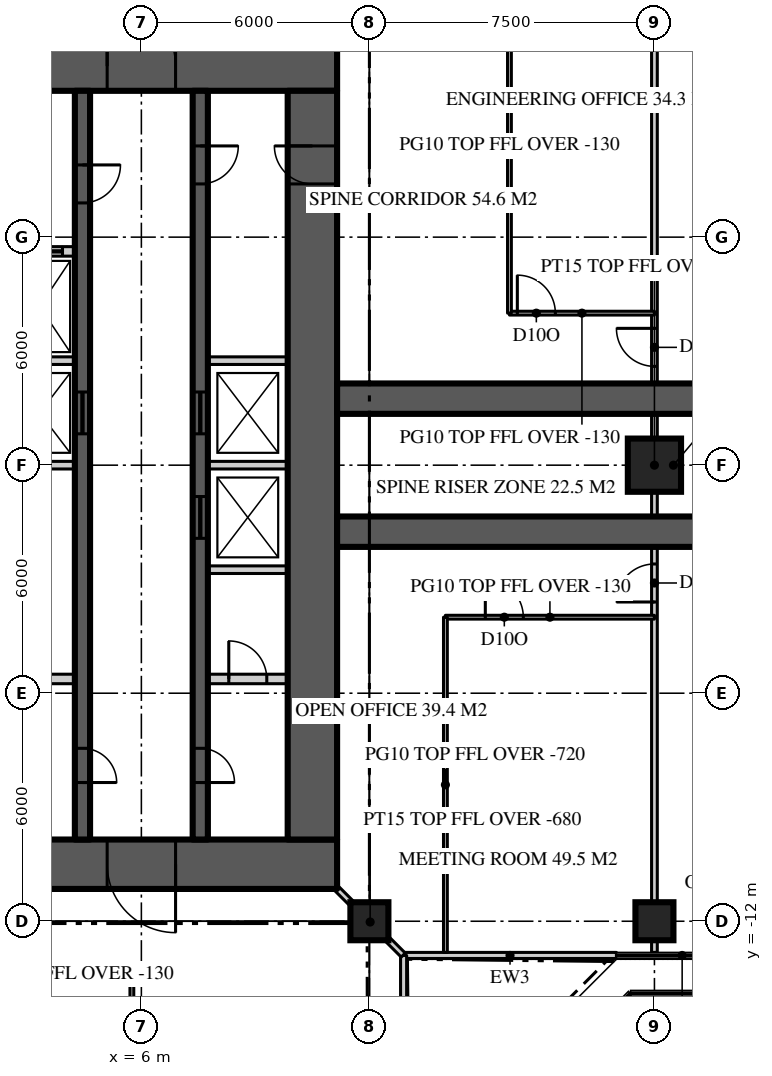
"""IFC4 building model, lengths in metres.
Left out: names, types, materials, properties, quantities, classifications, styles, units other than length and angle.
Written with IfcOpenShell. Run it as: python <this file> out.ifc"""

import sys

from ifc_helpers import new_model, si_unit, direction, frame, frame_2d, origin, origin_2d, place, context, subcontext, project, spatial, rectangle, extrude, element, fill, save


model = new_model("IFC4")
c1 = context("Model", 3, precision=1e-05, world=origin(), true_north=direction((0.0, 1.0)))
c2 = subcontext(c1, "Body", "Model", "MODEL_VIEW")
j1 = project(units=[si_unit("LENGTHUNIT", "METRE"), si_unit("PLANEANGLEUNIT", "RADIAN")], contexts=[c1])
p1 = place(None, origin())
s1 = spatial("IfcSite", under=j1, at=p1, CompositionType="ELEMENT")
p2 = place(p1, origin())
s2 = spatial("IfcBuilding", under=s1, at=p2, CompositionType="ELEMENT")
p3 = place(p2, frame((0.0, 0.0, 271.2)))
s3 = spatial("IfcBuildingStorey", under=s2, at=p3, CompositionType="ELEMENT", Elevation=271.2)
p4 = place(p3, frame((-11.15, 10.5, 0.0), z_axis=(0.0, 0.0, 1.0), x_axis=(1.0, 0.0, 0.0)))
e1 = element("IfcWall", 1, at=p4, inside=s3, PredefinedType="SHEAR", context=c2, shape_type="SweptSolid", body=[
    extrude(rectangle(XDim=22.3, YDim=1.3, at=frame_2d((11.15, 0.0))), origin(), (0.0, 0.0, 1.0), 3.9),
])
p5 = place(p4, frame((4.25, 0.0, 0.0)))
e2 = element("IfcOpeningElement", 2, at=p5, cuts=e1, PredefinedType="OPENING", context=c2, shape_type="SweptSolid", body=[
    extrude(rectangle(XDim=1.8, YDim=2.2, at=frame_2d((0.9, 1.1))), frame((0.0, 0.66, 0.0), z_axis=(0.0, -1.0, 0.0), x_axis=(1.0, 0.0, 0.0)), (0.0, 0.0, 1.0), 1.32),
])
p6 = place(p4, frame((16.25, 0.0, 0.0)))
e3 = element("IfcOpeningElement", 3, at=p6, cuts=e1, PredefinedType="OPENING", context=c2, shape_type="SweptSolid", body=[
    extrude(rectangle(XDim=1.8, YDim=2.2, at=frame_2d((0.9, 1.1))), frame((0.0, 0.66, 0.0), z_axis=(0.0, -1.0, 0.0), x_axis=(1.0, 0.0, 0.0)), (0.0, 0.0, 1.0), 1.32),
])
p7 = place(p3, frame((11.15, -10.5, 0.0), z_axis=(0.0, 0.0, 1.0), x_axis=(-1.0, 0.0, 0.0)))
e4 = element("IfcWall", 4, at=p7, inside=s3, PredefinedType="SHEAR", context=c2, shape_type="SweptSolid", body=[
    extrude(rectangle(XDim=22.3, YDim=1.3, at=frame_2d((11.15, 0.0))), origin(), (0.0, 0.0, 1.0), 3.9),
])
p8 = place(p7, frame((16.25, 0.0, 0.0)))
e5 = element("IfcOpeningElement", 5, at=p8, cuts=e4, PredefinedType="OPENING", context=c2, shape_type="SweptSolid", body=[
    extrude(rectangle(XDim=1.8, YDim=2.2, at=frame_2d((0.9, 1.1))), frame((0.0, 0.66, 0.0), z_axis=(0.0, -1.0, 0.0), x_axis=(1.0, 0.0, 0.0)), (0.0, 0.0, 1.0), 1.32),
])
p9 = place(p7, frame((4.25, 0.0, 0.0)))
e6 = element("IfcOpeningElement", 6, at=p9, cuts=e4, PredefinedType="OPENING", context=c2, shape_type="SweptSolid", body=[
    extrude(rectangle(XDim=1.8, YDim=2.2, at=frame_2d((0.9, 1.1))), frame((0.0, 0.66, 0.0), z_axis=(0.0, -1.0, 0.0), x_axis=(1.0, 0.0, 0.0)), (0.0, 0.0, 1.0), 1.32),
])
p10 = place(p3, frame((10.5, -9.85, 0.0), z_axis=(0.0, 0.0, 1.0), x_axis=(0.0, 1.0, 0.0)))
e7 = element("IfcWall", 7, at=p10, inside=s3, PredefinedType="SHEAR", context=c2, shape_type="SweptSolid", body=[
    extrude(rectangle(XDim=19.7, YDim=1.3, at=frame_2d((9.85, 0.0))), origin(), (0.0, 0.0, 1.0), 3.9),
])
p11 = place(p10, frame((17.25, 0.0, 0.0)))
e8 = element("IfcOpeningElement", 8, at=p11, cuts=e7, PredefinedType="OPENING", context=c2, shape_type="SweptSolid", body=[
    extrude(rectangle(XDim=1.0, YDim=2.2, at=frame_2d((0.5, 1.1))), frame((0.0, 0.66, 0.0), z_axis=(0.0, -1.0, 0.0), x_axis=(1.0, 0.0, 0.0)), (0.0, 0.0, 1.0), 1.32),
])
for number, where, z_axis, x_axis in (
    (9, (11.15, -1.75, 0.0), (0.0, 0.0, 1.0), (1.0, 0.0, 0.0)),
    (10, (11.15, 1.75, 0.0), (0.0, 0.0, 1.0), (1.0, 0.0, 0.0)),
):
    element("IfcWall", number, at=place(p3, frame(where, z_axis=z_axis, x_axis=x_axis)), inside=s3, PredefinedType="SHEAR", context=c2, shape_type="SweptSolid", body=[
        extrude(rectangle(XDim=15.25, YDim=0.8, at=frame_2d((7.625, 0.0))), origin(), (0.0, 0.0, 1.0), 3.9),
    ])
for number, where, z_axis, x_axis in (
    (11, (12.0, -12.0, 0.0), (0.0, 0.0, 1.0), (1.0, 0.0, 0.0)),
    (12, (19.5, -12.0, 0.0), (0.0, 0.0, 1.0), (1.0, 0.0, 0.0)),
):
    element("IfcColumn", number, at=place(p3, frame(where, z_axis=z_axis, x_axis=x_axis)), inside=s3, PredefinedType="COLUMN", context=c2, shape_type="SweptSolid", body=[
        extrude(rectangle(XDim=1.0, YDim=1.0, at=origin_2d()), origin(), (0.0, 0.0, 1.0), 3.9),
    ])
p12 = place(p3, frame((19.5, 0.0, 0.0), z_axis=(0.0, 0.0, 1.0), x_axis=(1.0, 0.0, 0.0)))
e13 = element("IfcColumn", 13, at=p12, inside=s3, PredefinedType="COLUMN", context=c2, shape_type="SweptSolid", body=[
    extrude(rectangle(XDim=1.4, YDim=1.4, at=origin_2d()), origin(), (0.0, 0.0, 1.0), 3.9),
])
p13 = place(p3, frame((12.9, -12.9, 0.0), z_axis=(0.0, 0.0, 1.0), x_axis=(1.0, 0.0, 0.0)))
e14 = element("IfcWall", 14, at=p13, inside=s3, PredefinedType="SOLIDWALL", context=c2, shape_type="SweptSolid", body=[
    extrude(rectangle(XDim=5.6, YDim=0.16, at=frame_2d((2.8, 0.0))), origin(), (0.0, 0.0, 1.0), 3.77),
])
p14 = place(p3, frame((12.9, -18.5, 0.0), z_axis=(0.0, 0.0, 1.0), x_axis=(0.0, 1.0, 0.0)))
e15 = element("IfcWall", 15, at=p14, inside=s3, PredefinedType="SOLIDWALL", context=c2, shape_type="SweptSolid", body=[
    extrude(rectangle(XDim=5.6, YDim=0.16, at=frame_2d((2.8, 0.0))), origin(), (0.0, 0.0, 1.0), 3.77),
])
p15 = place(p14, frame((2.3, 0.0, 0.0)))
e16 = element("IfcOpeningElement", 16, at=p15, cuts=e15, PredefinedType="OPENING", context=c2, shape_type="SweptSolid", body=[
    extrude(rectangle(XDim=1.0, YDim=2.2, at=frame_2d((0.5, 1.1))), frame((0.0, 0.09, 0.0), z_axis=(0.0, -1.0, 0.0), x_axis=(1.0, 0.0, 0.0)), (0.0, 0.0, 1.0), 0.18),
])
p16 = place(p3, frame((7.55, 9.85, 0.0), z_axis=(0.0, 0.0, 1.0), x_axis=(0.0, -1.0, 0.0)))
e17 = element("IfcWall", 17, at=p16, inside=s3, PredefinedType="SHEAR", context=c2, shape_type="SweptSolid", body=[
    extrude(rectangle(XDim=19.7, YDim=0.4, at=frame_2d((9.85, 0.0))), origin(), (0.0, 0.0, 1.0), 3.9),
])
p17 = place(p16, frame((1.45, 0.0, 0.0)))
e18 = element("IfcOpeningElement", 18, at=p17, cuts=e17, PredefinedType="OPENING", context=c2, shape_type="SweptSolid", body=[
    extrude(rectangle(XDim=1.0, YDim=2.2, at=frame_2d((0.5, 1.1))), frame((0.0, 0.21, 0.0), z_axis=(0.0, -1.0, 0.0), x_axis=(1.0, 0.0, 0.0)), (0.0, 0.0, 1.0), 0.42),
])
p18 = place(p16, frame((17.3, 0.0, 0.0)))
e19 = element("IfcOpeningElement", 19, at=p18, cuts=e17, PredefinedType="OPENING", context=c2, shape_type="SweptSolid", body=[
    extrude(rectangle(XDim=0.9, YDim=2.1, at=frame_2d((0.45, 1.05))), frame((0.0, 0.21, 0.0), z_axis=(0.0, -1.0, 0.0), x_axis=(1.0, 0.0, 0.0)), (0.0, 0.0, 1.0), 0.42),
])
p19 = place(p16, frame((7.925, 0.0, 0.0)))
e20 = element("IfcOpeningElement", 20, at=p19, cuts=e17, PredefinedType="OPENING", context=c2, shape_type="SweptSolid", body=[
    extrude(rectangle(XDim=1.1, YDim=2.2, at=frame_2d((0.55, 1.1))), frame((0.0, 0.21, 0.0), z_axis=(0.0, -1.0, 0.0), x_axis=(1.0, 0.0, 0.0)), (0.0, 0.0, 1.0), 0.42),
])
p20 = place(p16, frame((10.675, 0.0, 0.0)))
e21 = element("IfcOpeningElement", 21, at=p20, cuts=e17, PredefinedType="OPENING", context=c2, shape_type="SweptSolid", body=[
    extrude(rectangle(XDim=1.1, YDim=2.2, at=frame_2d((0.55, 1.1))), frame((0.0, 0.21, 0.0), z_axis=(0.0, -1.0, 0.0), x_axis=(1.0, 0.0, 0.0)), (0.0, 0.0, 1.0), 0.42),
])
p21 = place(p3, frame((4.45, 9.85, 0.0), z_axis=(0.0, 0.0, 1.0), x_axis=(0.0, -1.0, 0.0)))
e22 = element("IfcWall", 22, at=p21, inside=s3, PredefinedType="SHEAR", context=c2, shape_type="SweptSolid", body=[
    extrude(rectangle(XDim=19.7, YDim=0.4, at=frame_2d((9.85, 0.0))), origin(), (0.0, 0.0, 1.0), 3.9),
])
p22 = place(p21, frame((1.95, 0.0, 0.0)))
e23 = element("IfcOpeningElement", 23, at=p22, cuts=e22, PredefinedType="OPENING", context=c2, shape_type="SweptSolid", body=[
    extrude(rectangle(XDim=1.0, YDim=2.2, at=frame_2d((0.5, 1.1))), frame((0.0, 0.21, 0.0), z_axis=(0.0, -1.0, 0.0), x_axis=(1.0, 0.0, 0.0)), (0.0, 0.0, 1.0), 0.42),
])
p23 = place(p21, frame((17.3, 0.0, 0.0)))
e24 = element("IfcOpeningElement", 24, at=p23, cuts=e22, PredefinedType="OPENING", context=c2, shape_type="SweptSolid", body=[
    extrude(rectangle(XDim=0.9, YDim=2.1, at=frame_2d((0.45, 1.05))), frame((0.0, 0.21, 0.0), z_axis=(0.0, -1.0, 0.0), x_axis=(1.0, 0.0, 0.0)), (0.0, 0.0, 1.0), 0.42),
])
p24 = place(p21, frame((7.925, 0.0, 0.0)))
e25 = element("IfcOpeningElement", 25, at=p24, cuts=e22, PredefinedType="OPENING", context=c2, shape_type="SweptSolid", body=[
    extrude(rectangle(XDim=1.1, YDim=2.2, at=frame_2d((0.55, 1.1))), frame((0.0, 0.21, 0.0), z_axis=(0.0, -1.0, 0.0), x_axis=(1.0, 0.0, 0.0)), (0.0, 0.0, 1.0), 0.42),
])
p25 = place(p3, frame((2.4, 5.625, 0.0), z_axis=(0.0, 0.0, 1.0), x_axis=(1.0, 0.0, 0.0)))
e26 = element("IfcWall", 26, at=p25, inside=s3, PredefinedType="SOLIDWALL", context=c2, shape_type="SweptSolid", body=[
    extrude(rectangle(XDim=1.85, YDim=0.25, at=frame_2d((0.925, 0.0))), origin(), (0.0, 0.0, 1.0), 3.7),
])
p26 = place(p25, frame((0.325, 0.0, 0.0)))
e27 = element("IfcOpeningElement", 27, at=p26, cuts=e26, PredefinedType="OPENING", context=c2, shape_type="SweptSolid", body=[
    extrude(rectangle(XDim=1.2, YDim=2.2, at=frame_2d((0.6, 1.1))), frame((0.0, 0.135, 0.0), z_axis=(0.0, -1.0, 0.0), x_axis=(1.0, 0.0, 0.0)), (0.0, 0.0, 1.0), 0.27),
])
p27 = place(p3, frame((2.4, -5.625, 0.0), z_axis=(0.0, 0.0, 1.0), x_axis=(1.0, 0.0, 0.0)))
e28 = element("IfcWall", 28, at=p27, inside=s3, PredefinedType="SOLIDWALL", context=c2, shape_type="SweptSolid", body=[
    extrude(rectangle(XDim=1.85, YDim=0.25, at=frame_2d((0.925, 0.0))), origin(), (0.0, 0.0, 1.0), 3.7),
])
p28 = place(p3, frame((7.75, -5.625, 0.0), z_axis=(0.0, 0.0, 1.0), x_axis=(1.0, 0.0, 0.0)))
e29 = element("IfcWall", 29, at=p28, inside=s3, PredefinedType="SOLIDWALL", context=c2, shape_type="SweptSolid", body=[
    extrude(rectangle(XDim=2.1, YDim=0.25, at=frame_2d((1.05, 0.0))), origin(), (0.0, 0.0, 1.0), 3.7),
])
p29 = place(p28, frame((0.55, 0.0, 0.0)))
e30 = element("IfcOpeningElement", 30, at=p29, cuts=e29, PredefinedType="OPENING", context=c2, shape_type="SweptSolid", body=[
    extrude(rectangle(XDim=1.0, YDim=2.2, at=frame_2d((0.5, 1.1))), frame((0.0, 0.135, 0.0), z_axis=(0.0, -1.0, 0.0), x_axis=(1.0, 0.0, 0.0)), (0.0, 0.0, 1.0), 0.27),
])
p30 = place(p3, frame((7.75, -2.75, 0.0), z_axis=(0.0, 0.0, 1.0), x_axis=(1.0, 0.0, 0.0)))
e31 = element("IfcWall", 31, at=p30, inside=s3, PredefinedType="SOLIDWALL", context=c2, shape_type="SweptSolid", body=[
    extrude(rectangle(XDim=2.1, YDim=0.2, at=frame_2d((1.05, 0.0))), origin(), (0.0, 0.0, 1.0), 3.7),
])
p31 = place(p3, frame((2.4, 0.0, 0.0), z_axis=(0.0, 0.0, 1.0), x_axis=(1.0, 0.0, 0.0)))
e32 = element("IfcWall", 32, at=p31, inside=s3, PredefinedType="SOLIDWALL", context=c2, shape_type="SweptSolid", body=[
    extrude(rectangle(XDim=1.85, YDim=0.2, at=frame_2d((0.925, 0.0))), origin(), (0.0, 0.0, 1.0), 3.7),
])
p32 = place(p3, frame((7.75, 0.0, 0.0), z_axis=(0.0, 0.0, 1.0), x_axis=(1.0, 0.0, 0.0)))
e33 = element("IfcWall", 33, at=p32, inside=s3, PredefinedType="SOLIDWALL", context=c2, shape_type="SweptSolid", body=[
    extrude(rectangle(XDim=2.1, YDim=0.2, at=frame_2d((1.05, 0.0))), origin(), (0.0, 0.0, 1.0), 3.7),
])
p33 = place(p3, frame((2.4, 2.75, 0.0), z_axis=(0.0, 0.0, 1.0), x_axis=(1.0, 0.0, 0.0)))
e34 = element("IfcWall", 34, at=p33, inside=s3, PredefinedType="SOLIDWALL", context=c2, shape_type="SweptSolid", body=[
    extrude(rectangle(XDim=1.85, YDim=0.2, at=frame_2d((0.925, 0.0))), origin(), (0.0, 0.0, 1.0), 3.7),
])
p34 = place(p3, frame((7.75, 2.75, 0.0), z_axis=(0.0, 0.0, 1.0), x_axis=(1.0, 0.0, 0.0)))
e35 = element("IfcWall", 35, at=p34, inside=s3, PredefinedType="SOLIDWALL", context=c2, shape_type="SweptSolid", body=[
    extrude(rectangle(XDim=2.1, YDim=0.2, at=frame_2d((1.05, 0.0))), origin(), (0.0, 0.0, 1.0), 3.7),
])
p35 = place(p3, frame((19.5, -12.82, 0.0), z_axis=(0.0, 0.0, 1.0), x_axis=(0.0, 1.0, 0.0)))
e36 = element("IfcWall", 36, at=p35, inside=s3, PredefinedType="PARTITIONING", context=c2, shape_type="SweptSolid", body=[
    extrude(rectangle(XDim=25.64, YDim=0.15, at=frame_2d((12.82, 0.0))), origin(), (0.0, 0.0, 1.0), 2.77),
])
p36 = place(p35, frame((15.42, 0.0, 0.0)))
e37 = element("IfcOpeningElement", 37, at=p36, cuts=e36, PredefinedType="OPENING", context=c2, shape_type="SweptSolid", body=[
    extrude(rectangle(XDim=1.0, YDim=2.2, at=frame_2d((0.5, 1.1))), frame((0.0, 0.085, 0.0), z_axis=(0.0, -1.0, 0.0), x_axis=(1.0, 0.0, 0.0)), (0.0, 0.0, 1.0), 0.17),
])
p37 = place(p35, frame((9.22, 0.0, 0.0)))
e38 = element("IfcOpeningElement", 38, at=p37, cuts=e36, PredefinedType="OPENING", context=c2, shape_type="SweptSolid", body=[
    extrude(rectangle(XDim=1.0, YDim=2.2, at=frame_2d((0.5, 1.1))), frame((0.0, 0.085, 0.0), z_axis=(0.0, -1.0, 0.0), x_axis=(1.0, 0.0, 0.0)), (0.0, 0.0, 1.0), 0.17),
])
p38 = place(p3, frame((15.685, 4.0, 0.0), z_axis=(0.0, 0.0, 1.0), x_axis=(1.0, 0.0, 0.0)))
e39 = element("IfcWall", 39, at=p38, inside=s3, PredefinedType="PARTITIONING", context=c2, shape_type="SweptSolid", body=[
    extrude(rectangle(XDim=3.815, YDim=0.1, at=frame_2d((1.907, 0.0))), origin(), (0.0, 0.0, 1.0), 3.77),
])
p39 = place(p38, frame((0.208, 0.0, 0.0)))
e40 = element("IfcOpeningElement", 40, at=p39, cuts=e39, PredefinedType="OPENING", context=c2, shape_type="SweptSolid", body=[
    extrude(rectangle(XDim=1.0, YDim=2.2, at=frame_2d((0.5, 1.1))), frame((0.0, 0.06, 0.0), z_axis=(0.0, -1.0, 0.0), x_axis=(1.0, 0.0, 0.0)), (0.0, 0.0, 1.0), 0.12),
])
p40 = place(p3, frame((15.685, 4.0, 0.0), z_axis=(0.0, 0.0, 1.0), x_axis=(0.0, 1.0, 0.0)))
e41 = element("IfcWall", 41, at=p40, inside=s3, PredefinedType="PARTITIONING", context=c2, shape_type="SweptSolid", body=[
    extrude(rectangle(XDim=8.82, YDim=0.1, at=frame_2d((4.41, 0.0))), origin(), (0.0, 0.0, 1.0), 3.77),
])
p41 = place(p3, frame((14.0, -4.0, 0.0), z_axis=(0.0, 0.0, 1.0), x_axis=(1.0, 0.0, 0.0)))
e42 = element("IfcWall", 42, at=p41, inside=s3, PredefinedType="PARTITIONING", context=c2, shape_type="SweptSolid", body=[
    extrude(rectangle(XDim=5.5, YDim=0.1, at=frame_2d((2.75, 0.0))), origin(), (0.0, 0.0, 1.0), 3.77),
])
p42 = place(p41, frame((1.05, 0.0, 0.0)))
e43 = element("IfcOpeningElement", 43, at=p42, cuts=e42, PredefinedType="OPENING", context=c2, shape_type="SweptSolid", body=[
    extrude(rectangle(XDim=1.0, YDim=2.2, at=frame_2d((0.5, 1.1))), frame((0.0, 0.06, 0.0), z_axis=(0.0, -1.0, 0.0), x_axis=(1.0, 0.0, 0.0)), (0.0, 0.0, 1.0), 0.12),
])
p43 = place(p3, frame((14.0, -4.0, 0.0), z_axis=(0.0, 0.0, 1.0), x_axis=(0.0, -1.0, 0.0)))
e44 = element("IfcWall", 44, at=p43, inside=s3, PredefinedType="PARTITIONING", context=c2, shape_type="SweptSolid", body=[
    extrude(rectangle(XDim=8.82, YDim=0.1, at=frame_2d((4.41, 0.0))), origin(), (0.0, 0.0, 1.0), 3.18),
])
p44 = place(p3, frame((2.15, -13.4, 0.0), z_axis=(0.0, 0.0, 1.0), x_axis=(1.0, 0.0, 0.0)))
e45 = element("IfcWall", 45, at=p44, inside=s3, PredefinedType="PARTITIONING", context=c2, shape_type="SweptSolid", body=[
    extrude(rectangle(XDim=3.6, YDim=0.1, at=frame_2d((1.8, 0.0))), origin(), (0.0, 0.0, 1.0), 3.77),
])
p45 = place(p3, frame((5.75, -13.35, 0.0), z_axis=(0.0, 0.0, 1.0), x_axis=(0.0, -1.0, 0.0)))
e46 = element("IfcWall", 46, at=p45, inside=s3, PredefinedType="PARTITIONING", context=c2, shape_type="SweptSolid", body=[
    extrude(rectangle(XDim=4.1, YDim=0.1, at=frame_2d((2.05, 0.0))), origin(), (0.0, 0.0, 1.0), 3.77),
])
p46 = place(p45, frame((1.55, 0.0, 0.0)))
e47 = element("IfcOpeningElement", 47, at=p46, cuts=e46, PredefinedType="OPENING", context=c2, shape_type="SweptSolid", body=[
    extrude(rectangle(XDim=1.0, YDim=2.2, at=frame_2d((0.5, 1.1))), frame((0.0, 0.06, 0.0), z_axis=(0.0, -1.0, 0.0), x_axis=(1.0, 0.0, 0.0)), (0.0, 0.0, 1.0), 0.12),
])
p47 = place(p3, frame((11.15, -11.15, 0.0), z_axis=(0.0, 0.0, 1.0), x_axis=(0.707106781187, -0.707106781187, 0.0)))
e48 = element("IfcWall", 48, at=p47, inside=s3, PredefinedType="PARTITIONING", context=c2, shape_type="SweptSolid", body=[
    extrude(rectangle(XDim=2.461, YDim=0.15, at=frame_2d((1.23, 0.0))), origin(), (0.0, 0.0, 1.0), 3.22),
])
p48 = place(p6, origin())
e49 = element("IfcDoor", 49, at=p48, inside=s3, OperationType="DOUBLE_DOOR_DOUBLE_SWING", PredefinedType="DOOR", context=c2, shape_type="SweptSolid", body=[
    extrude(rectangle(XDim=1.8, YDim=2.2, at=frame_2d((0.9, 1.1))), frame((0.0, 0.025, 0.0), z_axis=(0.0, -1.0, 0.0), x_axis=(1.0, 0.0, 0.0)), (0.0, 0.0, 1.0), 0.05),
])
fill(e3, e49)
p49 = place(p9, origin())
e50 = element("IfcDoor", 50, at=p49, inside=s3, OperationType="DOUBLE_DOOR_DOUBLE_SWING", PredefinedType="DOOR", context=c2, shape_type="SweptSolid", body=[
    extrude(rectangle(XDim=1.8, YDim=2.2, at=frame_2d((0.9, 1.1))), frame((0.0, 0.025, 0.0), z_axis=(0.0, -1.0, 0.0), x_axis=(1.0, 0.0, 0.0)), (0.0, 0.0, 1.0), 0.05),
])
fill(e6, e50)
p50 = place(p17, origin())
e51 = element("IfcDoor", 51, at=p50, inside=s3, OperationType="SINGLE_SWING_LEFT", PredefinedType="DOOR", context=c2, shape_type="SweptSolid", body=[
    extrude(rectangle(XDim=1.0, YDim=2.2, at=frame_2d((0.5, 1.1))), frame((0.0, 0.025, 0.0), z_axis=(0.0, -1.0, 0.0), x_axis=(1.0, 0.0, 0.0)), (0.0, 0.0, 1.0), 0.05),
])
fill(e18, e51)
p51 = place(p11, origin())
e52 = element("IfcDoor", 52, at=p51, inside=s3, OperationType="SINGLE_SWING_RIGHT", PredefinedType="DOOR", context=c2, shape_type="SweptSolid", body=[
    extrude(rectangle(XDim=1.0, YDim=2.2, at=frame_2d((0.5, 1.1))), frame((0.0, 0.025, 0.0), z_axis=(0.0, -1.0, 0.0), x_axis=(1.0, 0.0, 0.0)), (0.0, 0.0, 1.0), 0.05),
])
fill(e8, e52)
p52 = place(p22, origin())
e53 = element("IfcDoor", 53, at=p52, inside=s3, OperationType="SINGLE_SWING_LEFT", PredefinedType="DOOR", context=c2, shape_type="SweptSolid", body=[
    extrude(rectangle(XDim=1.0, YDim=2.2, at=frame_2d((0.5, 1.1))), frame((0.0, 0.025, 0.0), z_axis=(0.0, -1.0, 0.0), x_axis=(1.0, 0.0, 0.0)), (0.0, 0.0, 1.0), 0.05),
])
fill(e23, e53)
p53 = place(p18, origin())
e54 = element("IfcDoor", 54, at=p53, inside=s3, OperationType="SINGLE_SWING_RIGHT", PredefinedType="DOOR", context=c2, shape_type="SweptSolid", body=[
    extrude(rectangle(XDim=0.9, YDim=2.1, at=frame_2d((0.45, 1.05))), frame((0.0, 0.025, 0.0), z_axis=(0.0, -1.0, 0.0), x_axis=(1.0, 0.0, 0.0)), (0.0, 0.0, 1.0), 0.05),
])
fill(e19, e54)
p54 = place(p23, origin())
e55 = element("IfcDoor", 55, at=p54, inside=s3, OperationType="SINGLE_SWING_RIGHT", PredefinedType="DOOR", context=c2, shape_type="SweptSolid", body=[
    extrude(rectangle(XDim=0.9, YDim=2.1, at=frame_2d((0.45, 1.05))), frame((0.0, 0.025, 0.0), z_axis=(0.0, -1.0, 0.0), x_axis=(1.0, 0.0, 0.0)), (0.0, 0.0, 1.0), 0.05),
])
fill(e24, e55)
p55 = place(p19, origin())
e56 = element("IfcDoor", 56, at=p55, inside=s3, OperationType="SLIDING_TO_LEFT", PredefinedType="DOOR", context=c2, shape_type="SweptSolid", body=[
    extrude(rectangle(XDim=1.1, YDim=2.2, at=frame_2d((0.55, 1.1))), frame((0.0, 0.025, 0.0), z_axis=(0.0, -1.0, 0.0), x_axis=(1.0, 0.0, 0.0)), (0.0, 0.0, 1.0), 0.05),
])
fill(e20, e56)
p56 = place(p20, origin())
e57 = element("IfcDoor", 57, at=p56, inside=s3, OperationType="SLIDING_TO_LEFT", PredefinedType="DOOR", context=c2, shape_type="SweptSolid", body=[
    extrude(rectangle(XDim=1.1, YDim=2.2, at=frame_2d((0.55, 1.1))), frame((0.0, 0.025, 0.0), z_axis=(0.0, -1.0, 0.0), x_axis=(1.0, 0.0, 0.0)), (0.0, 0.0, 1.0), 0.05),
])
fill(e21, e57)
p57 = place(p24, origin())
e58 = element("IfcDoor", 58, at=p57, inside=s3, OperationType="SLIDING_TO_LEFT", PredefinedType="DOOR", context=c2, shape_type="SweptSolid", body=[
    extrude(rectangle(XDim=1.1, YDim=2.2, at=frame_2d((0.55, 1.1))), frame((0.0, 0.025, 0.0), z_axis=(0.0, -1.0, 0.0), x_axis=(1.0, 0.0, 0.0)), (0.0, 0.0, 1.0), 0.05),
])
fill(e25, e58)
p58 = place(p26, origin())
e59 = element("IfcDoor", 59, at=p58, inside=s3, OperationType="SLIDING_TO_LEFT", PredefinedType="DOOR", context=c2, shape_type="SweptSolid", body=[
    extrude(rectangle(XDim=1.2, YDim=2.2, at=frame_2d((0.6, 1.1))), frame((0.0, 0.025, 0.0), z_axis=(0.0, -1.0, 0.0), x_axis=(1.0, 0.0, 0.0)), (0.0, 0.0, 1.0), 0.05),
])
fill(e27, e59)
p59 = place(p36, origin())
e60 = element("IfcDoor", 60, at=p59, inside=s3, OperationType="SINGLE_SWING_RIGHT", PredefinedType="DOOR", context=c2, shape_type="SweptSolid", body=[
    extrude(rectangle(XDim=1.0, YDim=2.2, at=frame_2d((0.5, 1.1))), frame((0.0, 0.025, 0.0), z_axis=(0.0, -1.0, 0.0), x_axis=(1.0, 0.0, 0.0)), (0.0, 0.0, 1.0), 0.05),
])
fill(e37, e60)
p60 = place(p37, origin())
e61 = element("IfcDoor", 61, at=p60, inside=s3, OperationType="SINGLE_SWING_LEFT", PredefinedType="DOOR", context=c2, shape_type="SweptSolid", body=[
    extrude(rectangle(XDim=1.0, YDim=2.2, at=frame_2d((0.5, 1.1))), frame((0.0, 0.025, 0.0), z_axis=(0.0, -1.0, 0.0), x_axis=(1.0, 0.0, 0.0)), (0.0, 0.0, 1.0), 0.05),
])
fill(e38, e61)
p61 = place(p39, origin())
e62 = element("IfcDoor", 62, at=p61, inside=s3, OperationType="SINGLE_SWING_LEFT", PredefinedType="DOOR", context=c2, shape_type="SweptSolid", body=[
    extrude(rectangle(XDim=1.0, YDim=2.2, at=frame_2d((0.5, 1.1))), frame((0.0, 0.025, 0.0), z_axis=(0.0, -1.0, 0.0), x_axis=(1.0, 0.0, 0.0)), (0.0, 0.0, 1.0), 0.05),
])
fill(e40, e62)
p62 = place(p42, origin())
e63 = element("IfcDoor", 63, at=p62, inside=s3, OperationType="SINGLE_SWING_LEFT", PredefinedType="DOOR", context=c2, shape_type="SweptSolid", body=[
    extrude(rectangle(XDim=1.0, YDim=2.2, at=frame_2d((0.5, 1.1))), frame((0.0, 0.025, 0.0), z_axis=(0.0, -1.0, 0.0), x_axis=(1.0, 0.0, 0.0)), (0.0, 0.0, 1.0), 0.05),
])
fill(e43, e63)
p63 = place(p29, origin())
e64 = element("IfcDoor", 64, at=p63, inside=s3, OperationType="SINGLE_SWING_LEFT", PredefinedType="DOOR", context=c2, shape_type="SweptSolid", body=[
    extrude(rectangle(XDim=1.0, YDim=2.2, at=frame_2d((0.5, 1.1))), frame((0.0, 0.025, 0.0), z_axis=(0.0, -1.0, 0.0), x_axis=(1.0, 0.0, 0.0)), (0.0, 0.0, 1.0), 0.05),
])
fill(e30, e64)
save(model, sys.argv[1])
